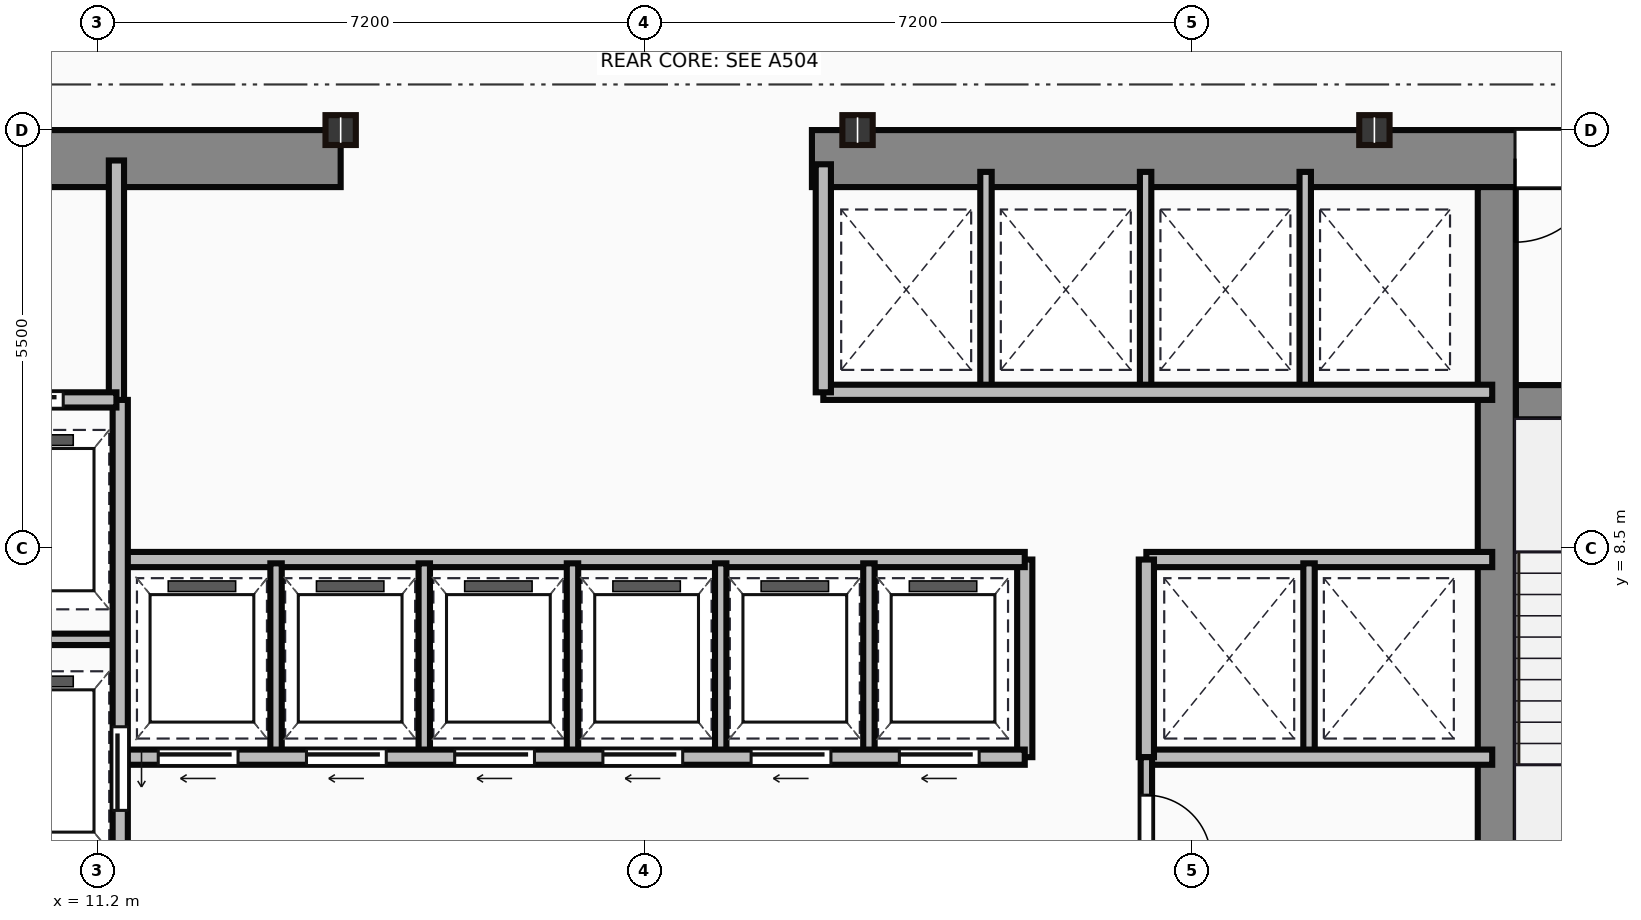
"""IFC4 building model, lengths in metres.
Left out: names, types, materials, properties, quantities, classifications, styles, units other than length and angle.
Written with IfcOpenShell. Run it as: python <this file> out.ifc"""

import sys

from ifc_helpers import new_model, si_unit, direction, frame, frame_2d, origin, origin_2d, place, context, subcontext, project, spatial, rectangle, i_section, extrude, source, transform, mapped, element, fill, save


model = new_model("IFC4")
c1 = context("Model", 3, precision=1e-05, world=origin(), true_north=direction((0.0, 1.0)))
c2 = subcontext(c1, "Body", "Model", "MODEL_VIEW")
j1 = project(units=[si_unit("LENGTHUNIT", "METRE"), si_unit("PLANEANGLEUNIT", "RADIAN")], contexts=[c1])
p1 = place(None, origin())
s1 = spatial("IfcSite", under=j1, at=p1, CompositionType="ELEMENT")
p2 = place(p1, origin())
s2 = spatial("IfcBuilding", under=s1, at=p2, CompositionType="ELEMENT")
p3 = place(p2, frame((0.0, 0.0, 88.65)))
s3 = spatial("IfcBuildingStorey", under=s2, at=p3, CompositionType="ELEMENT", Elevation=88.65)
m1 = source(origin(), c2, "Body", "SweptSolid", [
    extrude(rectangle(XDim=9.1, YDim=0.75, at=frame_2d((4.55, 0.0))), origin(), (0.0, 0.0, 1.0), 3.65),
])
p4 = place(p3, frame((5.3, 13.625, 0.0), z_axis=(0.0, 0.0, 1.0), x_axis=(1.0, 0.0, 0.0)))
e1 = element("IfcWall", 1, at=p4, inside=s3, PredefinedType="SHEAR", context=c2, shape_type="MappedRepresentation", body=[
    mapped(m1, transform((0.0, 0.0, 0.0))),
])
p5 = place(p4, frame((4.1, 0.0, 0.0)))
e2 = element("IfcOpeningElement", 2, at=p5, cuts=e1, PredefinedType="OPENING", context=c2, shape_type="SweptSolid", body=[
    extrude(rectangle(XDim=1.1, YDim=2.15, at=frame_2d((0.55, 1.075))), frame((0.0, 0.385, 0.0), z_axis=(0.0, -1.0, 0.0), x_axis=(1.0, 0.0, 0.0)), (0.0, 0.0, 1.0), 0.77),
])
m2 = source(origin(), c2, "Body", "SweptSolid", [
    extrude(rectangle(XDim=12.6, YDim=0.75, at=frame_2d((6.3, 0.0))), origin(), (0.0, 0.0, 1.0), 3.65),
])
p6 = place(p3, frame((20.6, 13.625, 0.0), z_axis=(0.0, 0.0, 1.0), x_axis=(1.0, 0.0, 0.0)))
e3 = element("IfcWall", 3, at=p6, inside=s3, PredefinedType="SHEAR", context=c2, shape_type="MappedRepresentation", body=[
    mapped(m2, transform((0.0, 0.0, 0.0))),
])
p7 = place(p6, frame((9.25, 0.0, 0.0)))
e4 = element("IfcOpeningElement", 4, at=p7, cuts=e3, PredefinedType="OPENING", context=c2, shape_type="SweptSolid", body=[
    extrude(rectangle(XDim=1.1, YDim=2.15, at=frame_2d((0.55, 1.075))), frame((0.0, 0.385, 0.0), z_axis=(0.0, -1.0, 0.0), x_axis=(1.0, 0.0, 0.0)), (0.0, 0.0, 1.0), 0.77),
])
m3 = source(origin(), c2, "Body", "SweptSolid", [
    extrude(rectangle(XDim=12.35, YDim=0.5, at=frame_2d((6.175, 0.0))), origin(), (0.0, 0.0, 1.0), 3.65),
])
p8 = place(p3, frame((29.61, 0.9, 0.0), z_axis=(0.0, 0.0, 1.0), x_axis=(0.0, 1.0, 0.0)))
e5 = element("IfcWall", 5, at=p8, inside=s3, PredefinedType="SHEAR", context=c2, shape_type="MappedRepresentation", body=[
    mapped(m3, transform((0.0, 0.0, 0.0))),
])
m4 = source(origin(), c2, "Body", "SweptSolid", [
    extrude(rectangle(XDim=3.39, YDim=0.45, at=frame_2d((1.695, 0.0))), origin(), (0.0, 0.0, 1.0), 3.65),
])
p9 = place(p3, frame((29.86, 10.42, 0.0), z_axis=(0.0, 0.0, 1.0), x_axis=(1.0, 0.0, 0.0)))
e6 = element("IfcWall", 6, at=p9, inside=s3, PredefinedType="SHEAR", context=c2, shape_type="MappedRepresentation", body=[
    mapped(m4, transform((0.0, 0.0, 0.0))),
])
p10 = place(p9, frame((1.1, 0.0, 0.0)))
e7 = element("IfcOpeningElement", 7, at=p10, cuts=e6, PredefinedType="OPENING", context=c2, shape_type="SweptSolid", body=[
    extrude(rectangle(XDim=1.1, YDim=2.15, at=frame_2d((0.55, 1.075))), frame((0.0, 0.235, 0.0), z_axis=(0.0, -1.0, 0.0), x_axis=(1.0, 0.0, 0.0)), (0.0, 0.0, 1.0), 0.47),
])
m5 = source(origin(), c2, "Body", "SweptSolid", [
    extrude(i_section(OverallWidth=0.399, OverallDepth=0.393, WebThickness=0.023, FlangeThickness=0.037, at=origin_2d()), origin(), (0.0, 0.0, 1.0), 3.65),
])
for number, where, z_axis, x_axis in (
    (8, (14.4, 14.0, 0.0), (0.0, 0.0, 1.0), (1.0, 0.0, 0.0)),
    (9, (21.2, 14.0, 0.0), (0.0, 0.0, 1.0), (1.0, 0.0, 0.0)),
    (10, (28.0, 14.0, 0.0), (0.0, 0.0, 1.0), (1.0, 0.0, 0.0)),
):
    element("IfcColumn", number, at=place(p3, frame(where, z_axis=z_axis, x_axis=x_axis)), inside=s3, PredefinedType="COLUMN", context=c2, shape_type="MappedRepresentation", body=[
        mapped(m5, transform((0.0, 0.0, 0.0))),
    ])
m6 = source(origin(), c2, "Body", "SweptSolid", [
    extrude(rectangle(XDim=3.18, YDim=0.2, at=frame_2d((1.59, 0.0))), origin(), (0.0, 0.0, 1.0), 3.4),
])
p11 = place(p3, frame((11.45, 10.42, 0.0), z_axis=(0.0, 0.0, 1.0), x_axis=(0.0, 1.0, 0.0)))
e11 = element("IfcWall", 11, at=p11, inside=s3, PredefinedType="PARTITIONING", context=c2, shape_type="MappedRepresentation", body=[
    mapped(m6, transform((0.0, 0.0, 0.0))),
])
m7 = source(origin(), c2, "Body", "SweptSolid", [
    extrude(rectangle(XDim=2.35, YDim=0.2, at=frame_2d((1.175, 0.0))), origin(), (0.0, 0.0, 1.0), 3.4),
])
p12 = place(p3, frame((9.1, 10.45, 0.0), z_axis=(0.0, 0.0, 1.0), x_axis=(1.0, 0.0, 0.0)))
e12 = element("IfcWall", 12, at=p12, inside=s3, PredefinedType="PARTITIONING", context=c2, shape_type="MappedRepresentation", body=[
    mapped(m7, transform((0.0, 0.0, 0.0))),
])
p13 = place(p12, frame((0.55, 0.0, 0.0)))
e13 = element("IfcOpeningElement", 13, at=p13, cuts=e12, PredefinedType="OPENING", context=c2, shape_type="SweptSolid", body=[
    extrude(rectangle(XDim=1.1, YDim=2.15, at=frame_2d((0.55, 1.075))), frame((0.0, 0.11, 0.0), z_axis=(0.0, -1.0, 0.0), x_axis=(1.0, 0.0, 0.0)), (0.0, 0.0, 1.0), 0.22),
])
m8 = source(origin(), c2, "Body", "SweptSolid", [
    extrude(rectangle(XDim=9.6, YDim=0.2, at=frame_2d((4.8, 0.0))), origin(), (0.0, 0.0, 1.0), 3.4),
])
p14 = place(p3, frame((11.5, 0.85, 0.0), z_axis=(0.0, 0.0, 1.0), x_axis=(0.0, 1.0, 0.0)))
e14 = element("IfcWall", 14, at=p14, inside=s3, PredefinedType="PARTITIONING", context=c2, shape_type="MappedRepresentation", body=[
    mapped(m8, transform((0.0, 0.0, 0.0))),
])
p15 = place(p14, frame((4.2, 0.0, 0.0)))
e15 = element("IfcOpeningElement", 15, at=p15, cuts=e14, PredefinedType="OPENING", context=c2, shape_type="SweptSolid", body=[
    extrude(rectangle(XDim=1.1, YDim=2.15, at=frame_2d((0.55, 1.075))), frame((0.0, 0.11, 0.0), z_axis=(0.0, -1.0, 0.0), x_axis=(1.0, 0.0, 0.0)), (0.0, 0.0, 1.0), 0.22),
])
p16 = place(p14, frame((0.9, 0.0, 0.0)))
e16 = element("IfcOpeningElement", 16, at=p16, cuts=e14, PredefinedType="OPENING", context=c2, shape_type="SweptSolid", body=[
    extrude(rectangle(XDim=1.2, YDim=2.15, at=frame_2d((0.6, 1.075))), frame((0.0, 0.11, 0.0), z_axis=(0.0, -1.0, 0.0), x_axis=(1.0, 0.0, 0.0)), (0.0, 0.0, 1.0), 0.22),
])
m9 = source(origin(), c2, "Body", "SweptSolid", [
    extrude(rectangle(XDim=2.4, YDim=0.15, at=frame_2d((1.2, 0.0))), origin(), (0.0, 0.0, 1.0), 3.4),
])
p17 = place(p3, frame((9.1, 7.3, 0.0), z_axis=(0.0, 0.0, 1.0), x_axis=(1.0, 0.0, 0.0)))
e17 = element("IfcWall", 17, at=p17, inside=s3, PredefinedType="PARTITIONING", context=c2, shape_type="MappedRepresentation", body=[
    mapped(m9, transform((0.0, 0.0, 0.0))),
])
m10 = source(origin(), c2, "Body", "SweptSolid", [
    extrude(rectangle(XDim=11.85, YDim=0.2, at=frame_2d((5.925, 0.0))), origin(), (0.0, 0.0, 1.0), 3.4),
])
p18 = place(p3, frame((11.55, 5.75, 0.0), z_axis=(0.0, 0.0, 1.0), x_axis=(1.0, 0.0, 0.0)))
e18 = element("IfcWall", 18, at=p18, inside=s3, PredefinedType="PARTITIONING", context=c2, shape_type="MappedRepresentation", body=[
    mapped(m10, transform((0.0, 0.0, 0.0))),
])
p19 = place(p18, frame((0.45, 0.0, 0.0)))
e19 = element("IfcOpeningElement", 19, at=p19, cuts=e18, PredefinedType="OPENING", context=c2, shape_type="SweptSolid", body=[
    extrude(rectangle(XDim=1.05, YDim=2.15, at=frame_2d((0.525, 1.075))), frame((0.0, 0.11, 0.0), z_axis=(0.0, -1.0, 0.0), x_axis=(1.0, 0.0, 0.0)), (0.0, 0.0, 1.0), 0.22),
])
p20 = place(p18, frame((2.4, 0.0, 0.0)))
e20 = element("IfcOpeningElement", 20, at=p20, cuts=e18, PredefinedType="OPENING", context=c2, shape_type="SweptSolid", body=[
    extrude(rectangle(XDim=1.05, YDim=2.15, at=frame_2d((0.525, 1.075))), frame((0.0, 0.11, 0.0), z_axis=(0.0, -1.0, 0.0), x_axis=(1.0, 0.0, 0.0)), (0.0, 0.0, 1.0), 0.22),
])
p21 = place(p18, frame((4.35, 0.0, 0.0)))
e21 = element("IfcOpeningElement", 21, at=p21, cuts=e18, PredefinedType="OPENING", context=c2, shape_type="SweptSolid", body=[
    extrude(rectangle(XDim=1.05, YDim=2.15, at=frame_2d((0.525, 1.075))), frame((0.0, 0.11, 0.0), z_axis=(0.0, -1.0, 0.0), x_axis=(1.0, 0.0, 0.0)), (0.0, 0.0, 1.0), 0.22),
])
p22 = place(p18, frame((6.3, 0.0, 0.0)))
e22 = element("IfcOpeningElement", 22, at=p22, cuts=e18, PredefinedType="OPENING", context=c2, shape_type="SweptSolid", body=[
    extrude(rectangle(XDim=1.05, YDim=2.15, at=frame_2d((0.525, 1.075))), frame((0.0, 0.11, 0.0), z_axis=(0.0, -1.0, 0.0), x_axis=(1.0, 0.0, 0.0)), (0.0, 0.0, 1.0), 0.22),
])
p23 = place(p18, frame((8.25, 0.0, 0.0)))
e23 = element("IfcOpeningElement", 23, at=p23, cuts=e18, PredefinedType="OPENING", context=c2, shape_type="SweptSolid", body=[
    extrude(rectangle(XDim=1.05, YDim=2.15, at=frame_2d((0.525, 1.075))), frame((0.0, 0.11, 0.0), z_axis=(0.0, -1.0, 0.0), x_axis=(1.0, 0.0, 0.0)), (0.0, 0.0, 1.0), 0.22),
])
p24 = place(p18, frame((10.2, 0.0, 0.0)))
e24 = element("IfcOpeningElement", 24, at=p24, cuts=e18, PredefinedType="OPENING", context=c2, shape_type="SweptSolid", body=[
    extrude(rectangle(XDim=1.05, YDim=2.15, at=frame_2d((0.525, 1.075))), frame((0.0, 0.11, 0.0), z_axis=(0.0, -1.0, 0.0), x_axis=(1.0, 0.0, 0.0)), (0.0, 0.0, 1.0), 0.22),
])
p25 = place(p3, frame((11.55, 8.35, 0.0), z_axis=(0.0, 0.0, 1.0), x_axis=(1.0, 0.0, 0.0)))
e25 = element("IfcWall", 25, at=p25, inside=s3, PredefinedType="PARTITIONING", context=c2, shape_type="MappedRepresentation", body=[
    mapped(m10, transform((0.0, 0.0, 0.0))),
])
m11 = source(origin(), c2, "Body", "SweptSolid", [
    extrude(rectangle(XDim=2.6, YDim=0.2, at=frame_2d((1.3, 0.0))), origin(), (0.0, 0.0, 1.0), 3.4),
])
p26 = place(p3, frame((23.4, 5.75, 0.0), z_axis=(0.0, 0.0, 1.0), x_axis=(0.0, 1.0, 0.0)))
e26 = element("IfcWall", 26, at=p26, inside=s3, PredefinedType="PARTITIONING", context=c2, shape_type="MappedRepresentation", body=[
    mapped(m11, transform((0.0, 0.0, 0.0))),
])
m12 = source(origin(), c2, "Body", "SweptSolid", [
    extrude(rectangle(XDim=2.5, YDim=0.15, at=frame_2d((1.25, 0.0))), origin(), (0.0, 0.0, 1.0), 3.4),
])
for number, where, z_axis, x_axis in (
    (27, (13.55, 5.8, 0.0), (0.0, 0.0, 1.0), (0.0, 1.0, 0.0)),
    (28, (15.5, 5.8, 0.0), (0.0, 0.0, 1.0), (0.0, 1.0, 0.0)),
    (29, (17.45, 5.8, 0.0), (0.0, 0.0, 1.0), (0.0, 1.0, 0.0)),
    (30, (19.4, 5.8, 0.0), (0.0, 0.0, 1.0), (0.0, 1.0, 0.0)),
    (31, (21.35, 5.8, 0.0), (0.0, 0.0, 1.0), (0.0, 1.0, 0.0)),
):
    element("IfcWall", number, at=place(p3, frame(where, z_axis=z_axis, x_axis=x_axis)), inside=s3, PredefinedType="PARTITIONING", context=c2, shape_type="MappedRepresentation", body=[
        mapped(m12, transform((0.0, 0.0, 0.0))),
    ])
m13 = source(origin(), c2, "Body", "SweptSolid", [
    extrude(rectangle(XDim=8.8, YDim=0.2, at=frame_2d((4.4, 0.0))), origin(), (0.0, 0.0, 1.0), 3.4),
])
p27 = place(p3, frame((20.75, 10.55, 0.0), z_axis=(0.0, 0.0, 1.0), x_axis=(1.0, 0.0, 0.0)))
e32 = element("IfcWall", 32, at=p27, inside=s3, PredefinedType="PARTITIONING", context=c2, shape_type="MappedRepresentation", body=[
    mapped(m13, transform((0.0, 0.0, 0.0))),
])
m14 = source(origin(), c2, "Body", "SweptSolid", [
    extrude(rectangle(XDim=3.0, YDim=0.2, at=frame_2d((1.5, 0.0))), origin(), (0.0, 0.0, 1.0), 3.4),
])
p28 = place(p3, frame((20.75, 10.55, 0.0), z_axis=(0.0, 0.0, 1.0), x_axis=(0.0, 1.0, 0.0)))
e33 = element("IfcWall", 33, at=p28, inside=s3, PredefinedType="PARTITIONING", context=c2, shape_type="MappedRepresentation", body=[
    mapped(m14, transform((0.0, 0.0, 0.0))),
])
m15 = source(origin(), c2, "Body", "SweptSolid", [
    extrude(rectangle(XDim=2.85, YDim=0.15, at=frame_2d((1.425, 0.0))), origin(), (0.0, 0.0, 1.0), 3.4),
])
for number, where, z_axis, x_axis in (
    (34, (22.89, 10.6, 0.0), (0.0, 0.0, 1.0), (0.0, 1.0, 0.0)),
    (35, (24.99, 10.6, 0.0), (0.0, 0.0, 1.0), (0.0, 1.0, 0.0)),
    (36, (27.09, 10.6, 0.0), (0.0, 0.0, 1.0), (0.0, 1.0, 0.0)),
):
    element("IfcWall", number, at=place(p3, frame(where, z_axis=z_axis, x_axis=x_axis)), inside=s3, PredefinedType="PARTITIONING", context=c2, shape_type="MappedRepresentation", body=[
        mapped(m15, transform((0.0, 0.0, 0.0))),
    ])
m16 = source(origin(), c2, "Body", "SweptSolid", [
    extrude(rectangle(XDim=4.55, YDim=0.2, at=frame_2d((2.275, 0.0))), origin(), (0.0, 0.0, 1.0), 3.4),
])
for number, where, z_axis, x_axis in (
    (37, (25.0, 8.35, 0.0), (0.0, 0.0, 1.0), (1.0, 0.0, 0.0)),
    (38, (25.0, 5.75, 0.0), (0.0, 0.0, 1.0), (1.0, 0.0, 0.0)),
):
    element("IfcWall", number, at=place(p3, frame(where, z_axis=z_axis, x_axis=x_axis)), inside=s3, PredefinedType="PARTITIONING", context=c2, shape_type="MappedRepresentation", body=[
        mapped(m16, transform((0.0, 0.0, 0.0))),
    ])
p29 = place(p3, frame((25.0, 5.75, 0.0), z_axis=(0.0, 0.0, 1.0), x_axis=(0.0, 1.0, 0.0)))
e39 = element("IfcWall", 39, at=p29, inside=s3, PredefinedType="PARTITIONING", context=c2, shape_type="MappedRepresentation", body=[
    mapped(m11, transform((0.0, 0.0, 0.0))),
])
p30 = place(p3, frame((27.14, 5.8, 0.0), z_axis=(0.0, 0.0, 1.0), x_axis=(0.0, 1.0, 0.0)))
e40 = element("IfcWall", 40, at=p30, inside=s3, PredefinedType="PARTITIONING", context=c2, shape_type="MappedRepresentation", body=[
    mapped(m12, transform((0.0, 0.0, 0.0))),
])
m17 = source(origin(), c2, "Body", "SweptSolid", [
    extrude(rectangle(XDim=4.9, YDim=0.15, at=frame_2d((2.45, 0.0))), origin(), (0.0, 0.0, 1.0), 3.4),
])
p31 = place(p3, frame((25.0, 0.85, 0.0), z_axis=(0.0, 0.0, 1.0), x_axis=(0.0, 1.0, 0.0)))
e41 = element("IfcWall", 41, at=p31, inside=s3, PredefinedType="PARTITIONING", context=c2, shape_type="MappedRepresentation", body=[
    mapped(m17, transform((0.0, 0.0, 0.0))),
])
p32 = place(p31, frame((1.85, 0.0, 0.0)))
e42 = element("IfcOpeningElement", 42, at=p32, cuts=e41, PredefinedType="OPENING", context=c2, shape_type="SweptSolid", body=[
    extrude(rectangle(XDim=0.95, YDim=2.15, at=frame_2d((0.475, 1.075))), frame((0.0, 0.085, 0.0), z_axis=(0.0, -1.0, 0.0), x_axis=(1.0, 0.0, 0.0)), (0.0, 0.0, 1.0), 0.17),
])
p33 = place(p31, frame((3.55, 0.0, 0.0)))
e43 = element("IfcOpeningElement", 43, at=p33, cuts=e41, PredefinedType="OPENING", context=c2, shape_type="SweptSolid", body=[
    extrude(rectangle(XDim=0.85, YDim=2.15, at=frame_2d((0.425, 1.075))), frame((0.0, 0.085, 0.0), z_axis=(0.0, -1.0, 0.0), x_axis=(1.0, 0.0, 0.0)), (0.0, 0.0, 1.0), 0.17),
])
m18 = source(origin(), c2, "Body", "SweptSolid", [
    extrude(rectangle(XDim=1.1, YDim=2.15, at=frame_2d((0.55, 1.075))), frame((0.0, 0.025, 0.0), z_axis=(0.0, -1.0, 0.0), x_axis=(1.0, 0.0, 0.0)), (0.0, 0.0, 1.0), 0.05),
])
p34 = place(p7, origin())
e44 = element("IfcDoor", 44, at=p34, inside=s3, OperationType="SINGLE_SWING_LEFT", PredefinedType="DOOR", context=c2, shape_type="MappedRepresentation", body=[
    mapped(m18, transform((0.0, 0.0, 0.0))),
])
fill(e4, e44)
p35 = place(p13, origin())
e45 = element("IfcDoor", 45, at=p35, inside=s3, OperationType="SLIDING_TO_LEFT", PredefinedType="DOOR", context=c2, shape_type="MappedRepresentation", body=[
    mapped(m18, transform((0.0, 0.0, 0.0))),
])
fill(e13, e45)
p36 = place(p15, frame((1.1, 0.0, 0.0), z_axis=(0.0, 0.0, 1.0), x_axis=(-1.0, 0.0, 0.0)))
e46 = element("IfcDoor", 46, at=p36, inside=s3, OperationType="SLIDING_TO_LEFT", PredefinedType="DOOR", context=c2, shape_type="MappedRepresentation", body=[
    mapped(m18, transform((0.0, 0.0, 0.0))),
])
fill(e15, e46)
m19 = source(origin(), c2, "Body", "SweptSolid", [
    extrude(rectangle(XDim=1.05, YDim=2.15, at=frame_2d((0.525, 1.075))), frame((0.0, 0.025, 0.0), z_axis=(0.0, -1.0, 0.0), x_axis=(1.0, 0.0, 0.0)), (0.0, 0.0, 1.0), 0.05),
])
p37 = place(p19, frame((1.05, 0.0, 0.0), z_axis=(0.0, 0.0, 1.0), x_axis=(-1.0, 0.0, 0.0)))
e47 = element("IfcDoor", 47, at=p37, inside=s3, OperationType="SLIDING_TO_LEFT", PredefinedType="DOOR", context=c2, shape_type="MappedRepresentation", body=[
    mapped(m19, transform((0.0, 0.0, 0.0))),
])
fill(e19, e47)
p38 = place(p20, frame((1.05, 0.0, 0.0), z_axis=(0.0, 0.0, 1.0), x_axis=(-1.0, 0.0, 0.0)))
e48 = element("IfcDoor", 48, at=p38, inside=s3, OperationType="SLIDING_TO_LEFT", PredefinedType="DOOR", context=c2, shape_type="MappedRepresentation", body=[
    mapped(m19, transform((0.0, 0.0, 0.0))),
])
fill(e20, e48)
p39 = place(p21, frame((1.05, 0.0, 0.0), z_axis=(0.0, 0.0, 1.0), x_axis=(-1.0, 0.0, 0.0)))
e49 = element("IfcDoor", 49, at=p39, inside=s3, OperationType="SLIDING_TO_LEFT", PredefinedType="DOOR", context=c2, shape_type="MappedRepresentation", body=[
    mapped(m19, transform((0.0, 0.0, 0.0))),
])
fill(e21, e49)
p40 = place(p22, frame((1.05, 0.0, 0.0), z_axis=(0.0, 0.0, 1.0), x_axis=(-1.0, 0.0, 0.0)))
e50 = element("IfcDoor", 50, at=p40, inside=s3, OperationType="SLIDING_TO_LEFT", PredefinedType="DOOR", context=c2, shape_type="MappedRepresentation", body=[
    mapped(m19, transform((0.0, 0.0, 0.0))),
])
fill(e22, e50)
p41 = place(p23, frame((1.05, 0.0, 0.0), z_axis=(0.0, 0.0, 1.0), x_axis=(-1.0, 0.0, 0.0)))
e51 = element("IfcDoor", 51, at=p41, inside=s3, OperationType="SLIDING_TO_LEFT", PredefinedType="DOOR", context=c2, shape_type="MappedRepresentation", body=[
    mapped(m19, transform((0.0, 0.0, 0.0))),
])
fill(e23, e51)
p42 = place(p24, frame((1.05, 0.0, 0.0), z_axis=(0.0, 0.0, 1.0), x_axis=(-1.0, 0.0, 0.0)))
e52 = element("IfcDoor", 52, at=p42, inside=s3, OperationType="SLIDING_TO_LEFT", PredefinedType="DOOR", context=c2, shape_type="MappedRepresentation", body=[
    mapped(m19, transform((0.0, 0.0, 0.0))),
])
fill(e24, e52)
m20 = source(origin(), c2, "Body", "SweptSolid", [
    extrude(rectangle(XDim=0.85, YDim=2.15, at=frame_2d((0.425, 1.075))), frame((0.0, 0.025, 0.0), z_axis=(0.0, -1.0, 0.0), x_axis=(1.0, 0.0, 0.0)), (0.0, 0.0, 1.0), 0.05),
])
p43 = place(p33, origin())
e53 = element("IfcDoor", 53, at=p43, inside=s3, OperationType="SINGLE_SWING_LEFT", PredefinedType="DOOR", context=c2, shape_type="MappedRepresentation", body=[
    mapped(m20, transform((0.0, 0.0, 0.0))),
])
fill(e43, e53)
save(model, sys.argv[1])
